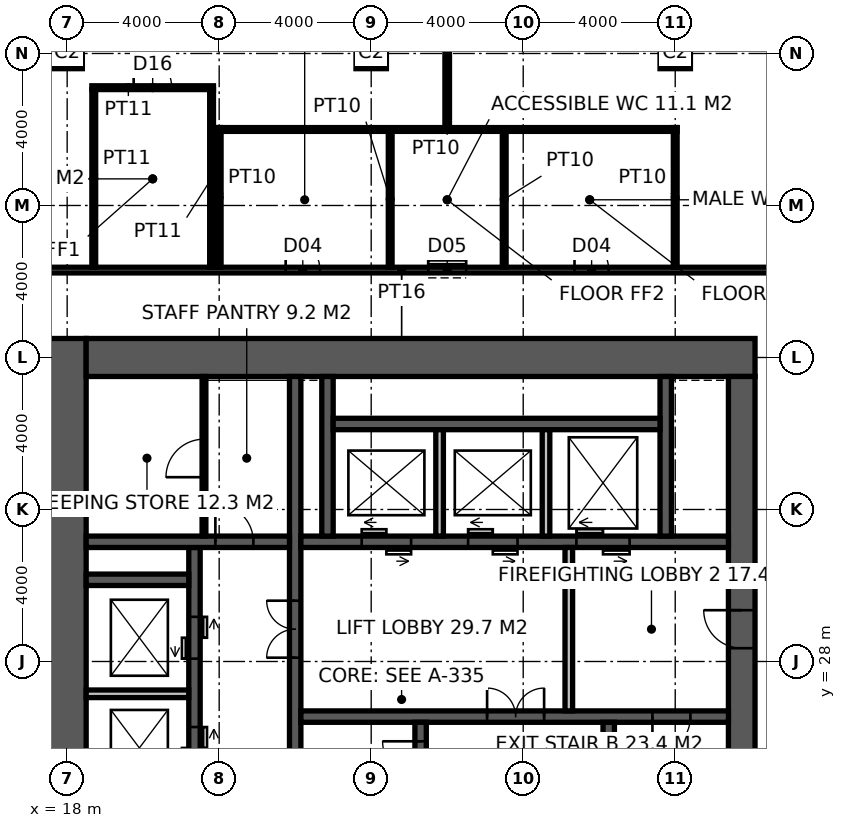
"""IFC4 building model, lengths in metres.
Left out: names, types, materials, properties, quantities, classifications, styles, units other than length and angle.
Written with IfcOpenShell. Run it as: python <this file> out.ifc"""

import sys

from ifc_helpers import new_model, si_unit, direction, frame, frame_2d, origin, origin_2d, place, context, subcontext, project, spatial, rectangle, hollow_rectangle, extrude, element, fill, save


model = new_model("IFC4")
c1 = context("Model", 3, precision=1e-05, world=origin(), true_north=direction((0.0, 1.0)))
c2 = subcontext(c1, "Body", "Model", "MODEL_VIEW")
j1 = project(units=[si_unit("LENGTHUNIT", "METRE"), si_unit("PLANEANGLEUNIT", "RADIAN")], contexts=[c1])
p1 = place(None, origin())
s1 = spatial("IfcSite", under=j1, at=p1, CompositionType="ELEMENT")
p2 = place(p1, origin())
s2 = spatial("IfcBuilding", under=s1, at=p2, CompositionType="ELEMENT")
p3 = place(p2, frame((0.0, 0.0, 209.2)))
s3 = spatial("IfcBuildingStorey", under=s2, at=p3, CompositionType="ELEMENT", Elevation=209.2)
for number, where, z_axis, x_axis in (
    (1, (18.0, 44.0, 0.0), (0.0, 0.0, 1.0), (1.0, 0.0, 0.0)),
    (2, (26.0, 44.0, 0.0), (0.0, 0.0, 1.0), (1.0, 0.0, 0.0)),
    (3, (34.0, 44.0, 0.0), (0.0, 0.0, 1.0), (1.0, 0.0, 0.0)),
):
    element("IfcColumn", number, at=place(p3, frame(where, z_axis=z_axis, x_axis=x_axis)), inside=s3, PredefinedType="COLUMN", context=c2, shape_type="SweptSolid", body=[
        extrude(hollow_rectangle(XDim=0.8, YDim=0.8, WallThickness=0.08, at=origin_2d()), origin(), (0.0, 0.0, 1.0), 5.0),
    ])
p4 = place(p3, frame((18.0, 17.5, -0.15), z_axis=(0.0, 0.0, 1.0), x_axis=(0.0, 1.0, 0.0)))
e4 = element("IfcWall", 4, at=p4, inside=s3, PredefinedType="SHEAR", context=c2, shape_type="SweptSolid", body=[
    extrude(rectangle(XDim=19.0, YDim=1.0, at=frame_2d((9.5, 0.0))), origin(), (0.0, 0.0, 1.0), 5.0),
])
p5 = place(p3, frame((18.5, 36.0, -0.15), z_axis=(0.0, 0.0, 1.0), x_axis=(1.0, 0.0, 0.0)))
e5 = element("IfcWall", 5, at=p5, inside=s3, PredefinedType="SHEAR", context=c2, shape_type="SweptSolid", body=[
    extrude(rectangle(XDim=17.6, YDim=1.0, at=frame_2d((8.8, 0.0))), origin(), (0.0, 0.0, 1.0), 5.0),
])
p6 = place(p3, frame((35.75, 18.5, -0.15), z_axis=(0.0, 0.0, 1.0), x_axis=(0.0, 1.0, 0.0)))
e6 = element("IfcWall", 6, at=p6, inside=s3, PredefinedType="SHEAR", context=c2, shape_type="SweptSolid", body=[
    extrude(rectangle(XDim=17.0, YDim=0.7, at=frame_2d((8.5, 0.0))), origin(), (0.0, 0.0, 1.0), 5.0),
])
p7 = place(p6, frame((9.85, 0.0, 0.15)))
e7 = element("IfcOpeningElement", 7, at=p7, cuts=e6, PredefinedType="OPENING", context=c2, shape_type="SweptSolid", body=[
    extrude(rectangle(XDim=1.0, YDim=2.2, at=frame_2d((0.5, 1.1))), frame((0.0, 0.36, 0.0), z_axis=(0.0, -1.0, 0.0), x_axis=(1.0, 0.0, 0.0)), (0.0, 0.0, 1.0), 0.72),
])
p8 = place(p3, frame((24.0, 18.5, -0.15), z_axis=(0.0, 0.0, 1.0), x_axis=(0.0, 1.0, 0.0)))
e8 = element("IfcWall", 8, at=p8, inside=s3, PredefinedType="SHEAR", context=c2, shape_type="SweptSolid", body=[
    extrude(rectangle(XDim=17.0, YDim=0.3, at=frame_2d((8.5, 0.0))), origin(), (0.0, 0.0, 1.0), 5.0),
])
p9 = place(p8, frame((9.6, 0.0, 0.15)))
e9 = element("IfcOpeningElement", 9, at=p9, cuts=e8, PredefinedType="OPENING", context=c2, shape_type="SweptSolid", body=[
    extrude(rectangle(XDim=1.5, YDim=2.4, at=frame_2d((0.75, 1.2))), frame((0.0, 0.16, 0.0), z_axis=(0.0, -1.0, 0.0), x_axis=(1.0, 0.0, 0.0)), (0.0, 0.0, 1.0), 0.32),
])
p10 = place(p3, frame((24.15, 26.55, -0.15), z_axis=(0.0, 0.0, 1.0), x_axis=(1.0, 0.0, 0.0)))
e10 = element("IfcWall", 10, at=p10, inside=s3, PredefinedType="SHEAR", context=c2, shape_type="SweptSolid", body=[
    extrude(rectangle(XDim=11.25, YDim=0.3, at=frame_2d((5.625, 0.0))), origin(), (0.0, 0.0, 1.0), 5.0),
])
p11 = place(p10, frame((9.25, 0.0, 0.15)))
e11 = element("IfcOpeningElement", 11, at=p11, cuts=e10, PredefinedType="OPENING", context=c2, shape_type="SweptSolid", body=[
    extrude(rectangle(XDim=1.0, YDim=2.2, at=frame_2d((0.5, 1.1))), frame((0.0, 0.16, 0.0), z_axis=(0.0, -1.0, 0.0), x_axis=(1.0, 0.0, 0.0)), (0.0, 0.0, 1.0), 0.32),
])
p12 = place(p10, frame((4.9, 0.0, 0.15)))
e12 = element("IfcOpeningElement", 12, at=p12, cuts=e10, PredefinedType="OPENING", context=c2, shape_type="SweptSolid", body=[
    extrude(rectangle(XDim=1.5, YDim=2.4, at=frame_2d((0.75, 1.2))), frame((0.0, 0.16, 0.0), z_axis=(0.0, -1.0, 0.0), x_axis=(1.0, 0.0, 0.0)), (0.0, 0.0, 1.0), 0.32),
])
p13 = place(p3, frame((27.3, 18.5, -0.15), z_axis=(0.0, 0.0, 1.0), x_axis=(0.0, 1.0, 0.0)))
e13 = element("IfcWall", 13, at=p13, inside=s3, PredefinedType="SHEAR", context=c2, shape_type="SweptSolid", body=[
    extrude(rectangle(XDim=7.9, YDim=0.3, at=frame_2d((3.95, 0.0))), origin(), (0.0, 0.0, 1.0), 5.0),
])
p14 = place(p13, frame((6.4, 0.0, 0.15)))
e14 = element("IfcOpeningElement", 14, at=p14, cuts=e13, PredefinedType="OPENING", context=c2, shape_type="SweptSolid", body=[
    extrude(rectangle(XDim=1.0, YDim=2.2, at=frame_2d((0.5, 1.1))), frame((0.0, 0.16, 0.0), z_axis=(0.0, -1.0, 0.0), x_axis=(1.0, 0.0, 0.0)), (0.0, 0.0, 1.0), 0.32),
])
p15 = place(p3, frame((32.25, 18.5, -0.15), z_axis=(0.0, 0.0, 1.0), x_axis=(0.0, 1.0, 0.0)))
e15 = element("IfcWall", 15, at=p15, inside=s3, PredefinedType="SHEAR", context=c2, shape_type="SweptSolid", body=[
    extrude(rectangle(XDim=7.9, YDim=0.3, at=frame_2d((3.95, 0.0))), origin(), (0.0, 0.0, 1.0), 5.0),
])
p16 = place(p3, frame((24.15, 31.15, -0.15), z_axis=(0.0, 0.0, 1.0), x_axis=(1.0, 0.0, 0.0)))
e16 = element("IfcWall", 16, at=p16, inside=s3, PredefinedType="SHEAR", context=c2, shape_type="SweptSolid", body=[
    extrude(rectangle(XDim=11.25, YDim=0.3, at=frame_2d((5.625, 0.0))), origin(), (0.0, 0.0, 1.0), 5.0),
])
p17 = place(p16, frame((1.6, 0.0, 0.15)))
e17 = element("IfcOpeningElement", 17, at=p17, cuts=e16, PredefinedType="OPENING", context=c2, shape_type="SweptSolid", body=[
    extrude(rectangle(XDim=1.3, YDim=2.4, at=frame_2d((0.65, 1.2))), frame((0.0, 0.16, 0.0), z_axis=(0.0, -1.0, 0.0), x_axis=(1.0, 0.0, 0.0)), (0.0, 0.0, 1.0), 0.32),
])
p18 = place(p16, frame((4.4, 0.0, 0.15)))
e18 = element("IfcOpeningElement", 18, at=p18, cuts=e16, PredefinedType="OPENING", context=c2, shape_type="SweptSolid", body=[
    extrude(rectangle(XDim=1.3, YDim=2.4, at=frame_2d((0.65, 1.2))), frame((0.0, 0.16, 0.0), z_axis=(0.0, -1.0, 0.0), x_axis=(1.0, 0.0, 0.0)), (0.0, 0.0, 1.0), 0.32),
])
p19 = place(p16, frame((7.25, 0.0, 0.15)))
e19 = element("IfcOpeningElement", 19, at=p19, cuts=e16, PredefinedType="OPENING", context=c2, shape_type="SweptSolid", body=[
    extrude(rectangle(XDim=1.4, YDim=2.4, at=frame_2d((0.7, 1.2))), frame((0.0, 0.16, 0.0), z_axis=(0.0, -1.0, 0.0), x_axis=(1.0, 0.0, 0.0)), (0.0, 0.0, 1.0), 0.32),
])
p20 = place(p3, frame((21.35, 18.5, -0.15), z_axis=(0.0, 0.0, 1.0), x_axis=(0.0, 1.0, 0.0)))
e20 = element("IfcWall", 20, at=p20, inside=s3, PredefinedType="SHEAR", context=c2, shape_type="SweptSolid", body=[
    extrude(rectangle(XDim=12.5, YDim=0.3, at=frame_2d((6.25, 0.0))), origin(), (0.0, 0.0, 1.0), 5.0),
])
p21 = place(p20, frame((0.875, 0.0, 0.15)))
e21 = element("IfcOpeningElement", 21, at=p21, cuts=e20, PredefinedType="OPENING", context=c2, shape_type="SweptSolid", body=[
    extrude(rectangle(XDim=1.1, YDim=2.2, at=frame_2d((0.55, 1.1))), frame((0.0, 0.16, 0.0), z_axis=(0.0, -1.0, 0.0), x_axis=(1.0, 0.0, 0.0)), (0.0, 0.0, 1.0), 0.32),
])
p22 = place(p20, frame((3.825, 0.0, 0.15)))
e22 = element("IfcOpeningElement", 22, at=p22, cuts=e20, PredefinedType="OPENING", context=c2, shape_type="SweptSolid", body=[
    extrude(rectangle(XDim=1.1, YDim=2.2, at=frame_2d((0.55, 1.1))), frame((0.0, 0.16, 0.0), z_axis=(0.0, -1.0, 0.0), x_axis=(1.0, 0.0, 0.0)), (0.0, 0.0, 1.0), 0.32),
])
p23 = place(p20, frame((6.675, 0.0, 0.15)))
e23 = element("IfcOpeningElement", 23, at=p23, cuts=e20, PredefinedType="OPENING", context=c2, shape_type="SweptSolid", body=[
    extrude(rectangle(XDim=1.1, YDim=2.2, at=frame_2d((0.55, 1.1))), frame((0.0, 0.16, 0.0), z_axis=(0.0, -1.0, 0.0), x_axis=(1.0, 0.0, 0.0)), (0.0, 0.0, 1.0), 0.32),
])
p24 = place(p20, frame((9.575, 0.0, 0.15)))
e24 = element("IfcOpeningElement", 24, at=p24, cuts=e20, PredefinedType="OPENING", context=c2, shape_type="SweptSolid", body=[
    extrude(rectangle(XDim=1.1, YDim=2.2, at=frame_2d((0.55, 1.1))), frame((0.0, 0.16, 0.0), z_axis=(0.0, -1.0, 0.0), x_axis=(1.0, 0.0, 0.0)), (0.0, 0.0, 1.0), 0.32),
])
p25 = place(p3, frame((18.5, 31.15, -0.15), z_axis=(0.0, 0.0, 1.0), x_axis=(1.0, 0.0, 0.0)))
e25 = element("IfcWall", 25, at=p25, inside=s3, PredefinedType="SHEAR", context=c2, shape_type="SweptSolid", body=[
    extrude(rectangle(XDim=5.35, YDim=0.3, at=frame_2d((2.675, 0.0))), origin(), (0.0, 0.0, 1.0), 5.0),
])
p26 = place(p25, frame((3.4, 0.0, 0.15)))
e26 = element("IfcOpeningElement", 26, at=p26, cuts=e25, PredefinedType="OPENING", context=c2, shape_type="SweptSolid", body=[
    extrude(rectangle(XDim=1.0, YDim=2.2, at=frame_2d((0.5, 1.1))), frame((0.0, 0.16, 0.0), z_axis=(0.0, -1.0, 0.0), x_axis=(1.0, 0.0, 0.0)), (0.0, 0.0, 1.0), 0.32),
])
p27 = place(p3, frame((18.5, 30.15, -0.15), z_axis=(0.0, 0.0, 1.0), x_axis=(1.0, 0.0, 0.0)))
e27 = element("IfcWall", 27, at=p27, inside=s3, PredefinedType="SHEAR", context=c2, shape_type="SweptSolid", body=[
    extrude(rectangle(XDim=2.7, YDim=0.3, at=frame_2d((1.35, 0.0))), origin(), (0.0, 0.0, 1.0), 5.0),
])
for number, where, z_axis, x_axis in (
    (28, (24.85, 31.3, -0.15), (0.0, 0.0, 1.0), (0.0, 1.0, 0.0)),
    (29, (33.75, 31.3, -0.15), (0.0, 0.0, 1.0), (0.0, 1.0, 0.0)),
):
    element("IfcWall", number, at=place(p3, frame(where, z_axis=z_axis, x_axis=x_axis)), inside=s3, PredefinedType="SHEAR", context=c2, shape_type="SweptSolid", body=[
        extrude(rectangle(XDim=4.2, YDim=0.3, at=frame_2d((2.1, 0.0))), origin(), (0.0, 0.0, 1.0), 5.0),
    ])
p28 = place(p3, frame((25.0, 34.25, -0.15), z_axis=(0.0, 0.0, 1.0), x_axis=(1.0, 0.0, 0.0)))
e30 = element("IfcWall", 30, at=p28, inside=s3, PredefinedType="SHEAR", context=c2, shape_type="SweptSolid", body=[
    extrude(rectangle(XDim=8.6, YDim=0.3, at=frame_2d((4.3, 0.0))), origin(), (0.0, 0.0, 1.0), 5.0),
])
for number, where, z_axis, x_axis in (
    (31, (27.8, 31.3, -0.15), (0.0, 0.0, 1.0), (0.0, 1.0, 0.0)),
    (32, (30.6, 31.3, -0.15), (0.0, 0.0, 1.0), (0.0, 1.0, 0.0)),
):
    element("IfcWall", number, at=place(p3, frame(where, z_axis=z_axis, x_axis=x_axis)), inside=s3, PredefinedType="SOLIDWALL", context=c2, shape_type="SweptSolid", body=[
        extrude(rectangle(XDim=2.8, YDim=0.2, at=frame_2d((1.4, 0.0))), origin(), (0.0, 0.0, 1.0), 5.0),
    ])
p29 = place(p3, frame((18.5, 27.15, -0.15), z_axis=(0.0, 0.0, 1.0), x_axis=(1.0, 0.0, 0.0)))
e33 = element("IfcWall", 33, at=p29, inside=s3, PredefinedType="SOLIDWALL", context=c2, shape_type="SweptSolid", body=[
    extrude(rectangle(XDim=2.7, YDim=0.2, at=frame_2d((1.35, 0.0))), origin(), (0.0, 0.0, 1.0), 5.0),
])
p30 = place(p3, frame((31.2, 26.7, 0.0), z_axis=(0.0, 0.0, 1.0), x_axis=(0.0, 1.0, 0.0)))
e34 = element("IfcWall", 34, at=p30, inside=s3, PredefinedType="SOLIDWALL", context=c2, shape_type="SweptSolid", body=[
    extrude(rectangle(XDim=4.3, YDim=0.2, at=frame_2d((2.15, 0.0))), origin(), (0.0, 0.0, 1.0), 4.85),
])
p31 = place(p3, frame((21.6, 31.3, 0.0), z_axis=(0.0, 0.0, 1.0), x_axis=(0.0, 1.0, 0.0)))
e35 = element("IfcWall", 35, at=p31, inside=s3, PredefinedType="PARTITIONING", context=c2, shape_type="SweptSolid", body=[
    extrude(rectangle(XDim=4.2, YDim=0.1, at=frame_2d((2.1, 0.0))), origin(), (0.0, 0.0, 1.0), 4.85),
])
p32 = place(p31, frame((1.55, 0.0, 0.0)))
e36 = element("IfcOpeningElement", 36, at=p32, cuts=e35, PredefinedType="OPENING", context=c2, shape_type="SweptSolid", body=[
    extrude(rectangle(XDim=1.0, YDim=2.2, at=frame_2d((0.5, 1.1))), frame((0.0, 0.06, 0.0), z_axis=(0.0, -1.0, 0.0), x_axis=(1.0, 0.0, 0.0)), (0.0, 0.0, 1.0), 0.12),
])
p33 = place(p3, frame((15.775, 38.3, 0.0), z_axis=(0.0, 0.0, 1.0), x_axis=(1.0, 0.0, 0.0)))
e37 = element("IfcWall", 37, at=p33, inside=s3, PredefinedType="PARTITIONING", context=c2, shape_type="SweptSolid", body=[
    extrude(rectangle(XDim=22.05, YDim=0.15, at=frame_2d((11.025, 0.0))), origin(), (0.0, 0.0, 1.0), 4.85),
])
p34 = place(p33, frame((7.975, 0.0, 0.0)))
e38 = element("IfcOpeningElement", 38, at=p34, cuts=e37, PredefinedType="OPENING", context=c2, shape_type="SweptSolid", body=[
    extrude(rectangle(XDim=0.9, YDim=2.1, at=frame_2d((0.45, 1.05))), frame((0.0, 0.085, 0.0), z_axis=(0.0, -1.0, 0.0), x_axis=(1.0, 0.0, 0.0)), (0.0, 0.0, 1.0), 0.17),
])
p35 = place(p33, frame((11.725, 0.0, 0.0)))
e39 = element("IfcOpeningElement", 39, at=p35, cuts=e37, PredefinedType="OPENING", context=c2, shape_type="SweptSolid", body=[
    extrude(rectangle(XDim=1.0, YDim=2.1, at=frame_2d((0.5, 1.05))), frame((0.0, 0.085, 0.0), z_axis=(0.0, -1.0, 0.0), x_axis=(1.0, 0.0, 0.0)), (0.0, 0.0, 1.0), 0.17),
])
p36 = place(p33, frame((15.575, 0.0, 0.0)))
e40 = element("IfcOpeningElement", 40, at=p36, cuts=e37, PredefinedType="OPENING", context=c2, shape_type="SweptSolid", body=[
    extrude(rectangle(XDim=0.9, YDim=2.1, at=frame_2d((0.45, 1.05))), frame((0.0, 0.085, 0.0), z_axis=(0.0, -1.0, 0.0), x_axis=(1.0, 0.0, 0.0)), (0.0, 0.0, 1.0), 0.17),
])
for number, where, z_axis, x_axis in (
    (41, (22.0, 38.375, 0.0), (0.0, 0.0, 1.0), (0.0, 1.0, 0.0)),
    (42, (34.0, 38.375, 0.0), (0.0, 0.0, 1.0), (0.0, 1.0, 0.0)),
):
    element("IfcWall", number, at=place(p3, frame(where, z_axis=z_axis, x_axis=x_axis)), inside=s3, PredefinedType="PARTITIONING", context=c2, shape_type="SweptSolid", body=[
        extrude(rectangle(XDim=3.675, YDim=0.1, at=frame_2d((1.837, 0.0))), origin(), (0.0, 0.0, 1.0), 3.95),
    ])
p37 = place(p3, frame((21.95, 42.0, 0.0), z_axis=(0.0, 0.0, 1.0), x_axis=(1.0, 0.0, 0.0)))
e43 = element("IfcWall", 43, at=p37, inside=s3, PredefinedType="PARTITIONING", context=c2, shape_type="SweptSolid", body=[
    extrude(rectangle(XDim=12.1, YDim=0.1, at=frame_2d((6.05, 0.0))), origin(), (0.0, 0.0, 1.0), 4.85),
])
for number, where, z_axis, x_axis in (
    (44, (26.5, 38.375, 0.0), (0.0, 0.0, 1.0), (0.0, 1.0, 0.0)),
    (45, (29.5, 38.375, 0.0), (0.0, 0.0, 1.0), (0.0, 1.0, 0.0)),
):
    element("IfcWall", number, at=place(p3, frame(where, z_axis=z_axis, x_axis=x_axis)), inside=s3, PredefinedType="PARTITIONING", context=c2, shape_type="SweptSolid", body=[
        extrude(rectangle(XDim=3.575, YDim=0.1, at=frame_2d((1.788, 0.0))), origin(), (0.0, 0.0, 1.0), 4.85),
    ])
p38 = place(p3, frame((28.0, 42.05, 0.0), z_axis=(0.0, 0.0, 1.0), x_axis=(0.0, 1.0, 0.0)))
e46 = element("IfcWall", 46, at=p38, inside=s3, PredefinedType="PARTITIONING", context=c2, shape_type="SweptSolid", body=[
    extrude(rectangle(XDim=13.65, YDim=0.12, at=frame_2d((6.825, 0.0))), origin(), (0.0, 0.0, 1.0), 4.85),
])
p39 = place(p3, frame((18.65, 43.1, 0.0), z_axis=(0.0, 0.0, 1.0), x_axis=(1.0, 0.0, 0.0)))
e47 = element("IfcWall", 47, at=p39, inside=s3, PredefinedType="PARTITIONING", context=c2, shape_type="SweptSolid", body=[
    extrude(rectangle(XDim=3.2, YDim=0.1, at=frame_2d((1.6, 0.0))), origin(), (0.0, 0.0, 1.0), 4.85),
])
p40 = place(p39, frame((1.1, 0.0, 0.0)))
e48 = element("IfcOpeningElement", 48, at=p40, cuts=e47, PredefinedType="OPENING", context=c2, shape_type="SweptSolid", body=[
    extrude(rectangle(XDim=1.0, YDim=2.2, at=frame_2d((0.5, 1.1))), frame((0.0, 0.06, 0.0), z_axis=(0.0, -1.0, 0.0), x_axis=(1.0, 0.0, 0.0)), (0.0, 0.0, 1.0), 0.12),
])
p41 = place(p3, frame((18.7, 38.375, 0.0), z_axis=(0.0, 0.0, 1.0), x_axis=(0.0, 1.0, 0.0)))
e49 = element("IfcWall", 49, at=p41, inside=s3, PredefinedType="PARTITIONING", context=c2, shape_type="SweptSolid", body=[
    extrude(rectangle(XDim=4.675, YDim=0.1, at=frame_2d((2.337, 0.0))), origin(), (0.0, 0.0, 1.0), 4.85),
])
p42 = place(p3, frame((21.8, 38.375, 0.0), z_axis=(0.0, 0.0, 1.0), x_axis=(0.0, 1.0, 0.0)))
e50 = element("IfcWall", 50, at=p42, inside=s3, PredefinedType="PARTITIONING", context=c2, shape_type="SweptSolid", body=[
    extrude(rectangle(XDim=4.675, YDim=0.1, at=frame_2d((2.337, 0.0))), origin(), (0.0, 0.0, 1.0), 3.95),
])
p43 = place(p14, origin())
e51 = element("IfcDoor", 51, at=p43, inside=s3, OperationType="SINGLE_SWING_RIGHT", PredefinedType="DOOR", context=c2, shape_type="SweptSolid", body=[
    extrude(rectangle(XDim=1.0, YDim=2.2, at=frame_2d((0.5, 1.1))), frame((0.0, 0.025, 0.0), z_axis=(0.0, -1.0, 0.0), x_axis=(1.0, 0.0, 0.0)), (0.0, 0.0, 1.0), 0.05),
])
fill(e14, e51)
p44 = place(p11, frame((1.0, 0.0, 0.0), z_axis=(0.0, 0.0, 1.0), x_axis=(-1.0, 0.0, 0.0)))
e52 = element("IfcDoor", 52, at=p44, inside=s3, OperationType="SINGLE_SWING_RIGHT", PredefinedType="DOOR", context=c2, shape_type="SweptSolid", body=[
    extrude(rectangle(XDim=1.0, YDim=2.2, at=frame_2d((0.5, 1.1))), frame((0.0, 0.025, 0.0), z_axis=(0.0, -1.0, 0.0), x_axis=(1.0, 0.0, 0.0)), (0.0, 0.0, 1.0), 0.05),
])
fill(e11, e52)
p45 = place(p7, origin())
e53 = element("IfcDoor", 53, at=p45, inside=s3, OperationType="SINGLE_SWING_RIGHT", PredefinedType="DOOR", context=c2, shape_type="SweptSolid", body=[
    extrude(rectangle(XDim=1.0, YDim=2.2, at=frame_2d((0.5, 1.1))), frame((0.0, 0.025, 0.0), z_axis=(0.0, -1.0, 0.0), x_axis=(1.0, 0.0, 0.0)), (0.0, 0.0, 1.0), 0.05),
])
fill(e7, e53)
p46 = place(p12, origin())
e54 = element("IfcDoor", 54, at=p46, inside=s3, OperationType="DOUBLE_DOOR_DOUBLE_SWING", PredefinedType="DOOR", context=c2, shape_type="SweptSolid", body=[
    extrude(rectangle(XDim=1.5, YDim=2.4, at=frame_2d((0.75, 1.2))), frame((0.0, 0.025, 0.0), z_axis=(0.0, -1.0, 0.0), x_axis=(1.0, 0.0, 0.0)), (0.0, 0.0, 1.0), 0.05),
])
fill(e12, e54)
p47 = place(p9, origin())
e55 = element("IfcDoor", 55, at=p47, inside=s3, OperationType="DOUBLE_DOOR_DOUBLE_SWING", PredefinedType="DOOR", context=c2, shape_type="SweptSolid", body=[
    extrude(rectangle(XDim=1.5, YDim=2.4, at=frame_2d((0.75, 1.2))), frame((0.0, 0.025, 0.0), z_axis=(0.0, -1.0, 0.0), x_axis=(1.0, 0.0, 0.0)), (0.0, 0.0, 1.0), 0.05),
])
fill(e9, e55)
p48 = place(p26, origin())
e56 = element("IfcDoor", 56, at=p48, inside=s3, OperationType="SINGLE_SWING_LEFT", PredefinedType="DOOR", context=c2, shape_type="SweptSolid", body=[
    extrude(rectangle(XDim=1.0, YDim=2.2, at=frame_2d((0.5, 1.1))), frame((0.0, 0.025, 0.0), z_axis=(0.0, -1.0, 0.0), x_axis=(1.0, 0.0, 0.0)), (0.0, 0.0, 1.0), 0.05),
])
fill(e26, e56)
p49 = place(p32, origin())
e57 = element("IfcDoor", 57, at=p49, inside=s3, OperationType="SINGLE_SWING_LEFT", PredefinedType="DOOR", context=c2, shape_type="SweptSolid", body=[
    extrude(rectangle(XDim=1.0, YDim=2.2, at=frame_2d((0.5, 1.1))), frame((0.0, 0.025, 0.0), z_axis=(0.0, -1.0, 0.0), x_axis=(1.0, 0.0, 0.0)), (0.0, 0.0, 1.0), 0.05),
])
fill(e36, e57)
p50 = place(p34, origin())
e58 = element("IfcDoor", 58, at=p50, inside=s3, OperationType="SINGLE_SWING_LEFT", PredefinedType="DOOR", context=c2, shape_type="SweptSolid", body=[
    extrude(rectangle(XDim=0.9, YDim=2.1, at=frame_2d((0.45, 1.05))), frame((0.0, 0.025, 0.0), z_axis=(0.0, -1.0, 0.0), x_axis=(1.0, 0.0, 0.0)), (0.0, 0.0, 1.0), 0.05),
])
fill(e38, e58)
p51 = place(p35, origin())
e59 = element("IfcDoor", 59, at=p51, inside=s3, OperationType="SLIDING_TO_LEFT", PredefinedType="DOOR", context=c2, shape_type="SweptSolid", body=[
    extrude(rectangle(XDim=1.0, YDim=2.1, at=frame_2d((0.5, 1.05))), frame((0.0, 0.025, 0.0), z_axis=(0.0, -1.0, 0.0), x_axis=(1.0, 0.0, 0.0)), (0.0, 0.0, 1.0), 0.05),
])
fill(e39, e59)
p52 = place(p36, origin())
e60 = element("IfcDoor", 60, at=p52, inside=s3, OperationType="SINGLE_SWING_LEFT", PredefinedType="DOOR", context=c2, shape_type="SweptSolid", body=[
    extrude(rectangle(XDim=0.9, YDim=2.1, at=frame_2d((0.45, 1.05))), frame((0.0, 0.025, 0.0), z_axis=(0.0, -1.0, 0.0), x_axis=(1.0, 0.0, 0.0)), (0.0, 0.0, 1.0), 0.05),
])
fill(e40, e60)
p53 = place(p40, origin())
e61 = element("IfcDoor", 61, at=p53, inside=s3, OperationType="SINGLE_SWING_LEFT", PredefinedType="DOOR", context=c2, shape_type="SweptSolid", body=[
    extrude(rectangle(XDim=1.0, YDim=2.2, at=frame_2d((0.5, 1.1))), frame((0.0, 0.025, 0.0), z_axis=(0.0, -1.0, 0.0), x_axis=(1.0, 0.0, 0.0)), (0.0, 0.0, 1.0), 0.05),
])
fill(e48, e61)
p54 = place(p17, origin())
e62 = element("IfcDoor", 62, at=p54, inside=s3, OperationType="DOUBLE_DOOR_SLIDING", PredefinedType="DOOR", context=c2, shape_type="SweptSolid", body=[
    extrude(rectangle(XDim=1.3, YDim=2.4, at=frame_2d((0.65, 1.2))), frame((0.0, 0.025, 0.0), z_axis=(0.0, -1.0, 0.0), x_axis=(1.0, 0.0, 0.0)), (0.0, 0.0, 1.0), 0.05),
])
fill(e17, e62)
p55 = place(p18, origin())
e63 = element("IfcDoor", 63, at=p55, inside=s3, OperationType="DOUBLE_DOOR_SLIDING", PredefinedType="DOOR", context=c2, shape_type="SweptSolid", body=[
    extrude(rectangle(XDim=1.3, YDim=2.4, at=frame_2d((0.65, 1.2))), frame((0.0, 0.025, 0.0), z_axis=(0.0, -1.0, 0.0), x_axis=(1.0, 0.0, 0.0)), (0.0, 0.0, 1.0), 0.05),
])
fill(e18, e63)
p56 = place(p19, origin())
e64 = element("IfcDoor", 64, at=p56, inside=s3, OperationType="DOUBLE_DOOR_SLIDING", PredefinedType="DOOR", context=c2, shape_type="SweptSolid", body=[
    extrude(rectangle(XDim=1.4, YDim=2.4, at=frame_2d((0.7, 1.2))), frame((0.0, 0.025, 0.0), z_axis=(0.0, -1.0, 0.0), x_axis=(1.0, 0.0, 0.0)), (0.0, 0.0, 1.0), 0.05),
])
fill(e19, e64)
p57 = place(p23, origin())
e65 = element("IfcDoor", 65, at=p57, inside=s3, OperationType="DOUBLE_DOOR_SLIDING", PredefinedType="DOOR", context=c2, shape_type="SweptSolid", body=[
    extrude(rectangle(XDim=1.1, YDim=2.2, at=frame_2d((0.55, 1.1))), frame((0.0, 0.025, 0.0), z_axis=(0.0, -1.0, 0.0), x_axis=(1.0, 0.0, 0.0)), (0.0, 0.0, 1.0), 0.05),
])
fill(e23, e65)
p58 = place(p24, origin())
e66 = element("IfcDoor", 66, at=p58, inside=s3, OperationType="DOUBLE_DOOR_SLIDING", PredefinedType="DOOR", context=c2, shape_type="SweptSolid", body=[
    extrude(rectangle(XDim=1.1, YDim=2.2, at=frame_2d((0.55, 1.1))), frame((0.0, 0.025, 0.0), z_axis=(0.0, -1.0, 0.0), x_axis=(1.0, 0.0, 0.0)), (0.0, 0.0, 1.0), 0.05),
])
fill(e24, e66)
save(model, sys.argv[1])
